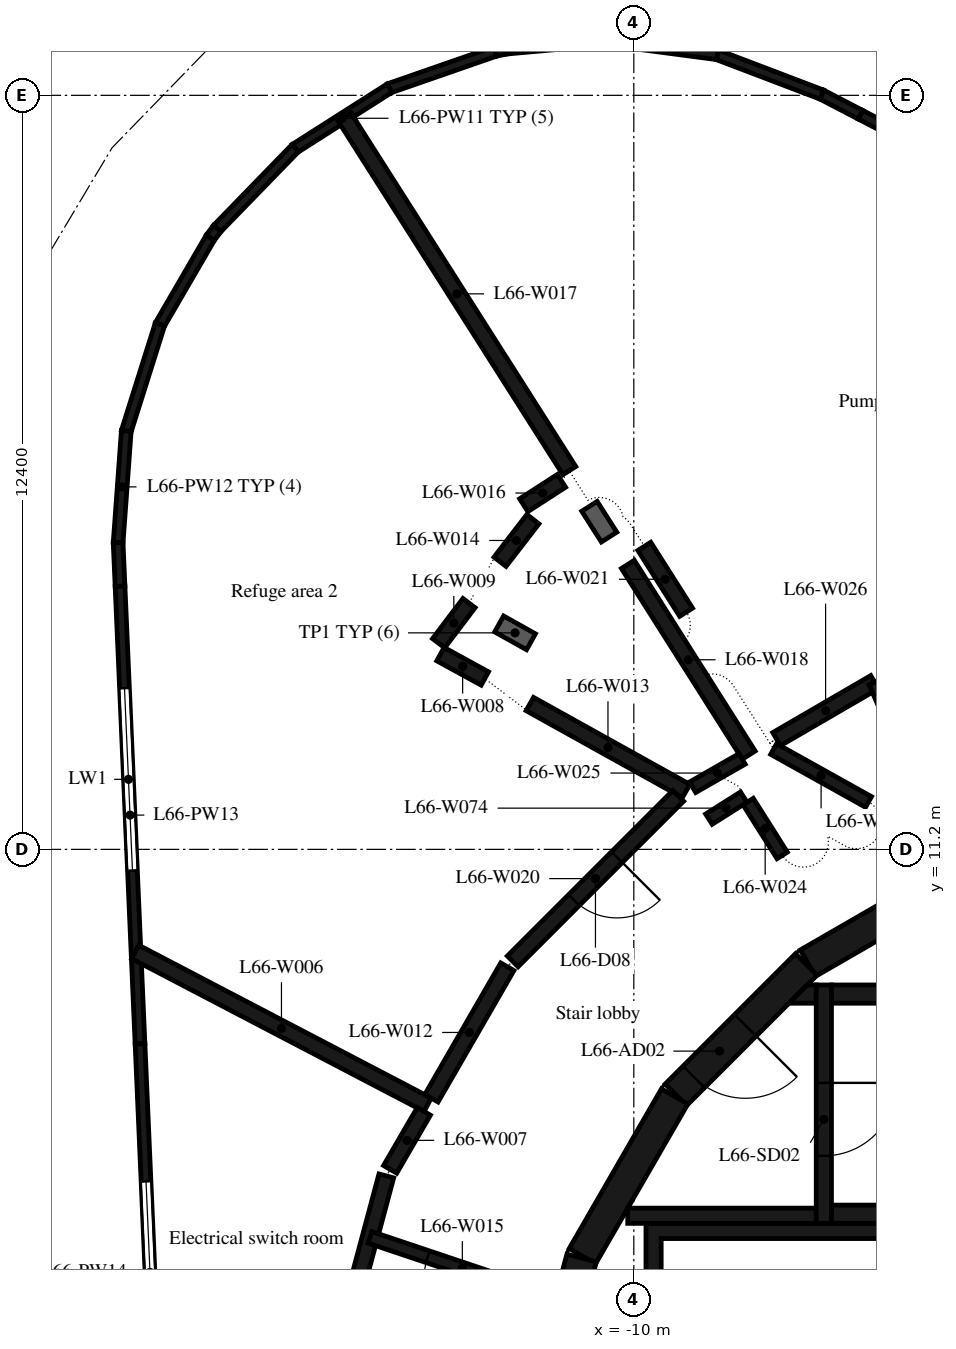
"""IFC4 building model, lengths in metres.
Left out: names, types, materials, properties, quantities, classifications, styles, units other than length and angle.
Written with IfcOpenShell. Run it as: python <this file> out.ifc"""

import sys

from ifc_helpers import new_model, si_unit, direction, frame, frame_2d, origin, place, context, subcontext, project, spatial, polyline, rectangle, outline, extrude, element, fill, save


model = new_model("IFC4")
c1 = context("Model", 3, precision=1e-05, world=origin(), true_north=direction((0.0, 1.0)))
c2 = subcontext(c1, "Body", "Model", "MODEL_VIEW")
j1 = project(units=[si_unit("LENGTHUNIT", "METRE"), si_unit("PLANEANGLEUNIT", "RADIAN")], contexts=[c1])
p1 = place(None, origin())
s1 = spatial("IfcSite", under=j1, at=p1, CompositionType="ELEMENT")
p2 = place(p1, origin())
s2 = spatial("IfcBuilding", under=s1, at=p2, CompositionType="ELEMENT")
p3 = place(p2, frame((0.0, 0.0, 258.2)))
s3 = spatial("IfcBuildingStorey", under=s2, at=p3, CompositionType="ELEMENT", Elevation=258.2)
p4 = place(p3, frame((0.406, 19.805, 0.0), z_axis=(0.0, 0.0, 1.0), x_axis=(-0.88700649569, 0.461756945377, 0.0)))
e1 = element("IfcWall", 1, at=p4, inside=s3, PredefinedType="STANDARD", context=c2, shape_type="SweptSolid", body=[
    extrude(rectangle(XDim=7.53, YDim=0.16, at=frame_2d((3.765, 0.0))), origin(), (0.0, 0.0, 1.0), 4.75),
])
p5 = place(p4, frame((5.598, 0.0, 1.0)))
e2 = element("IfcOpeningElement", 2, at=p5, cuts=e1, PredefinedType="OPENING", context=c2, shape_type="SweptSolid", body=[
    extrude(rectangle(XDim=1.2, YDim=2.2, at=frame_2d((0.6, 1.1))), frame((0.0, 0.09, 0.0), z_axis=(0.0, -1.0, 0.0), x_axis=(1.0, 0.0, 0.0)), (0.0, 0.0, 1.0), 0.18),
])
p6 = place(p3, frame((-6.274, 23.282, 0.0), z_axis=(0.0, 0.0, 1.0), x_axis=(-0.887061476856, 0.461651314607, 0.0)))
e3 = element("IfcWall", 3, at=p6, inside=s3, PredefinedType="STANDARD", context=c2, shape_type="SweptSolid", body=[
    extrude(rectangle(XDim=0.721, YDim=0.16, at=frame_2d((0.36, 0.0))), origin(), (0.0, 0.0, 1.0), 4.75),
])
p7 = place(p3, frame((-6.909, 23.613, 0.0), z_axis=(0.0, 0.0, 1.0), x_axis=(-0.934628033196, 0.355626826272, 0.0)))
e4 = element("IfcWall", 4, at=p7, inside=s3, PredefinedType="STANDARD", context=c2, shape_type="SweptSolid", body=[
    extrude(rectangle(XDim=1.846, YDim=0.16, at=frame_2d((0.923, 0.0))), origin(), (0.0, 0.0, 1.0), 4.75),
])
p8 = place(p3, frame((-8.625, 24.267, 0.0), z_axis=(0.0, 0.0, 1.0), x_axis=(-0.991428647281, 0.130649291427, 0.0)))
e5 = element("IfcWall", 5, at=p8, inside=s3, PredefinedType="STANDARD", context=c2, shape_type="SweptSolid", body=[
    extrude(rectangle(XDim=1.848, YDim=0.16, at=frame_2d((0.924, 0.0))), origin(), (0.0, 0.0, 1.0), 4.75),
])
p9 = place(p3, frame((-10.448, 24.508, 0.0), z_axis=(0.0, 0.0, 1.0), x_axis=(-0.995950985293, -0.089897913736, 0.0)))
e6 = element("IfcWall", 6, at=p9, inside=s3, PredefinedType="STANDARD", context=c2, shape_type="SweptSolid", body=[
    extrude(rectangle(XDim=1.656, YDim=0.16, at=frame_2d((0.828, 0.0))), origin(), (0.0, 0.0, 1.0), 4.75),
])
p10 = place(p3, frame((-12.098, 24.359, 0.0), z_axis=(0.0, 0.0, 1.0), x_axis=(-0.978969744076, -0.204005490574, 0.0)))
e7 = element("IfcWall", 7, at=p10, inside=s3, PredefinedType="STANDARD", context=c2, shape_type="SweptSolid", body=[
    extrude(rectangle(XDim=0.19, YDim=0.16, at=frame_2d((0.095, 0.0))), origin(), (0.0, 0.0, 1.0), 4.75),
])
p11 = place(p3, frame((-12.28, 24.322, 0.0), z_axis=(0.0, 0.0, 1.0), x_axis=(-0.944559218064, -0.328341108561, 0.0)))
e8 = element("IfcWall", 8, at=p11, inside=s3, PredefinedType="STANDARD", context=c2, shape_type="SweptSolid", body=[
    extrude(rectangle(XDim=1.846, YDim=0.16, at=frame_2d((0.923, 0.0))), origin(), (0.0, 0.0, 1.0), 4.75),
])
p12 = place(p3, frame((-14.015, 23.719, 0.0), z_axis=(0.0, 0.0, 1.0), x_axis=(-0.843373106488, -0.537328394236, 0.0)))
e9 = element("IfcWall", 9, at=p12, inside=s3, PredefinedType="STANDARD", context=c2, shape_type="SweptSolid", body=[
    extrude(rectangle(XDim=1.848, YDim=0.16, at=frame_2d((0.924, 0.0))), origin(), (0.0, 0.0, 1.0), 4.75),
])
p13 = place(p3, frame((-15.567, 22.732, 0.0), z_axis=(0.0, 0.0, 1.0), x_axis=(-0.696715693366, -0.71734736538, 0.0)))
e10 = element("IfcWall", 10, at=p13, inside=s3, PredefinedType="STANDARD", context=c2, shape_type="SweptSolid", body=[
    extrude(rectangle(XDim=1.846, YDim=0.16, at=frame_2d((0.923, 0.0))), origin(), (0.0, 0.0, 1.0), 4.75),
])
p14 = place(p3, frame((-16.85, 21.412, 0.0), z_axis=(0.0, 0.0, 1.0), x_axis=(-0.599178539895, -0.800615436605, 0.0)))
e11 = element("IfcWall", 11, at=p14, inside=s3, PredefinedType="STANDARD", context=c2, shape_type="SweptSolid", body=[
    extrude(rectangle(XDim=0.19, YDim=0.16, at=frame_2d((0.095, 0.0))), origin(), (0.0, 0.0, 1.0), 4.75),
])
p15 = place(p3, frame((-16.964, 21.26, 0.0), z_axis=(0.0, 0.0, 1.0), x_axis=(-0.502331021431, -0.864675398579, 0.0)))
e12 = element("IfcWall", 12, at=p15, inside=s3, PredefinedType="STANDARD", context=c2, shape_type="SweptSolid", body=[
    extrude(rectangle(XDim=1.657, YDim=0.16, at=frame_2d((0.828, 0.0))), origin(), (0.0, 0.0, 1.0), 4.75),
])
p16 = place(p3, frame((-17.792, 19.835, 0.0), z_axis=(0.0, 0.0, 1.0), x_axis=(-0.300688740971, -0.953722329116, 0.0)))
e13 = element("IfcWall", 13, at=p16, inside=s3, PredefinedType="STANDARD", context=c2, shape_type="SweptSolid", body=[
    extrude(rectangle(XDim=1.848, YDim=0.16, at=frame_2d((0.924, 0.0))), origin(), (0.0, 0.0, 1.0), 4.75),
])
p17 = place(p3, frame((-18.346, 18.082, 0.0), z_axis=(0.0, 0.0, 1.0), x_axis=(-0.072731814363, -0.997351534405, 0.0)))
e14 = element("IfcWall", 14, at=p17, inside=s3, PredefinedType="STANDARD", context=c2, shape_type="SweptSolid", body=[
    extrude(rectangle(XDim=1.846, YDim=0.16, at=frame_2d((0.923, 0.0))), origin(), (0.0, 0.0, 1.0), 4.75),
])
p18 = place(p3, frame((-18.48, 16.245, 0.0), z_axis=(0.0, 0.0, 1.0), x_axis=(0.043349043564, -0.9990599884, 0.0)))
e15 = element("IfcWall", 15, at=p18, inside=s3, PredefinedType="STANDARD", context=c2, shape_type="SweptSolid", body=[
    extrude(rectangle(XDim=0.721, YDim=0.16, at=frame_2d((0.36, 0.0))), origin(), (0.0, 0.0, 1.0), 4.75),
])
p19 = place(p3, frame((-18.449, 15.525, 0.0), z_axis=(0.0, 0.0, 1.0), x_axis=(0.043639829449, -0.999047328852, 0.0)))
e16 = element("IfcWall", 16, at=p19, inside=s3, PredefinedType="STANDARD", context=c2, shape_type="SweptSolid", body=[
    extrude(rectangle(XDim=7.53, YDim=0.16, at=frame_2d((3.765, 0.0))), origin(), (0.0, 0.0, 1.0), 4.75),
])
p20 = place(p19, frame((1.677, 0.0, 1.0)))
e17 = element("IfcOpeningElement", 17, at=p20, cuts=e16, PredefinedType="OPENING", context=c2, shape_type="SweptSolid", body=[
    extrude(rectangle(XDim=3.0, YDim=2.2, at=frame_2d((1.5, 1.1))), frame((0.0, 0.09, 0.0), z_axis=(0.0, -1.0, 0.0), x_axis=(1.0, 0.0, 0.0)), (0.0, 0.0, 1.0), 0.18),
])
p21 = place(p3, frame((-18.121, 8.002, 0.0), z_axis=(0.0, 0.0, 1.0), x_axis=(0.043608881799, -0.999048680209, 0.0)))
e18 = element("IfcWall", 18, at=p21, inside=s3, PredefinedType="STANDARD", context=c2, shape_type="SweptSolid", body=[
    extrude(rectangle(XDim=7.53, YDim=0.16, at=frame_2d((3.765, 0.0))), origin(), (0.0, 0.0, 1.0), 4.75),
])
p22 = place(p21, frame((2.265, 0.0, 1.0)))
e19 = element("IfcOpeningElement", 19, at=p22, cuts=e18, PredefinedType="OPENING", context=c2, shape_type="SweptSolid", body=[
    extrude(rectangle(XDim=3.0, YDim=2.2, at=frame_2d((1.5, 1.1))), frame((0.0, 0.09, 0.0), z_axis=(0.0, -1.0, 0.0), x_axis=(1.0, 0.0, 0.0)), (0.0, 0.0, 1.0), 0.18),
])
p23 = place(p3, frame((-4.51, 10.845, 0.0), z_axis=(0.0, 0.0, 1.0), x_axis=(-0.865975092491, -0.500087131594, 0.0)))
e20 = element("IfcWall", 20, at=p23, inside=s3, PredefinedType="SHEAR", context=c2, shape_type="SweptSolid", body=[
    extrude(rectangle(XDim=3.033, YDim=0.5, at=frame_2d((1.516, 0.0))), origin(), (0.0, 0.0, 1.0), 4.75),
])
p24 = place(p3, frame((-7.164, 9.308, 0.0), z_axis=(0.0, 0.0, 1.0), x_axis=(-0.707106781187, -0.707106781187, 0.0)))
e21 = element("IfcWall", 21, at=p24, inside=s3, PredefinedType="SHEAR", context=c2, shape_type="SweptSolid", body=[
    extrude(rectangle(XDim=3.032, YDim=0.5, at=frame_2d((1.516, 0.0))), origin(), (0.0, 0.0, 1.0), 4.75),
])
p25 = place(p24, frame((1.416, 0.0, 0.0)))
e22 = element("IfcOpeningElement", 22, at=p25, cuts=e21, PredefinedType="OPENING", context=c2, shape_type="SweptSolid", body=[
    extrude(rectangle(XDim=1.2, YDim=2.1, at=frame_2d((0.6, 1.05))), frame((0.0, 0.26, 0.0), z_axis=(0.0, -1.0, 0.0), x_axis=(1.0, 0.0, 0.0)), (0.0, 0.0, 1.0), 0.52),
])
for number, where, z_axis, x_axis in (
    (23, (-9.329, 7.137, 0.0), (0.0, 0.0, 1.0), (-0.5, -0.866, 0.0)),
    (24, (-10.858, 4.479, 0.0), (0.0, 0.0, 1.0), (-0.259, -0.966, 0.0)),
):
    element("IfcWall", number, at=place(p3, frame(where, z_axis=z_axis, x_axis=x_axis)), inside=s3, PredefinedType="SHEAR", context=c2, shape_type="SweptSolid", body=[
        extrude(rectangle(XDim=3.033, YDim=0.5, at=frame_2d((1.516, 0.0))), origin(), (0.0, 0.0, 1.0), 4.75),
    ])
for number, where, z_axis, x_axis in (
    (25, (-6.75, 5.2, 0.0), (0.0, 0.0, 1.0), (1.0, 0.0, 0.0)),
    (26, (-6.75, 8.82, 0.0), (0.0, 0.0, 1.0), (1.0, 0.0, 0.0)),
):
    element("IfcWall", number, at=place(p3, frame(where, z_axis=z_axis, x_axis=x_axis)), inside=s3, PredefinedType="SHEAR", context=c2, shape_type="SweptSolid", body=[
        extrude(rectangle(XDim=6.75, YDim=0.3, at=frame_2d((3.375, 0.0))), origin(), (0.0, 0.0, 1.0), 4.75),
    ])
p26 = place(p3, frame((-6.875, 8.97, 0.0), z_axis=(0.0, 0.0, 1.0), x_axis=(0.0, -1.0, 0.0)))
e27 = element("IfcWall", 27, at=p26, inside=s3, PredefinedType="SHEAR", context=c2, shape_type="SweptSolid", body=[
    extrude(rectangle(XDim=3.92, YDim=0.25, at=frame_2d((1.96, 0.0))), origin(), (0.0, 0.0, 1.0), 4.75),
])
p27 = place(p26, frame((1.61, 0.0, 0.0)))
e28 = element("IfcOpeningElement", 28, at=p27, cuts=e27, PredefinedType="OPENING", context=c2, shape_type="SweptSolid", body=[
    extrude(rectangle(XDim=1.2, YDim=2.1, at=frame_2d((0.6, 1.05))), frame((0.0, 0.135, 0.0), z_axis=(0.0, -1.0, 0.0), x_axis=(1.0, 0.0, 0.0)), (0.0, 0.0, 1.0), 0.27),
])
p28 = place(p3, frame((-7.0, 5.175, 0.0), z_axis=(0.0, 0.0, 1.0), x_axis=(-1.0, 0.0, 0.0)))
e29 = element("IfcWall", 29, at=p28, inside=s3, PredefinedType="SHEAR", context=c2, shape_type="SweptSolid", body=[
    extrude(rectangle(XDim=3.1, YDim=0.25, at=frame_2d((1.55, 0.0))), origin(), (0.0, 0.0, 1.0), 4.75),
])
p29 = place(p3, origin())
e30 = element("IfcWall", 30, at=p29, inside=s3, PredefinedType="SHEAR", context=c2, shape_type="SweptSolid", body=[
    extrude(outline(polyline([(-7.148, 8.97), (-7.0, 8.97), (-7.0, 8.67), (-7.448, 8.67), (-7.148, 8.97)])), origin(), (0.0, 0.0, 1.0), 4.75),
])
p30 = place(p3, origin())
e31 = element("IfcWall", 31, at=p30, inside=s3, PredefinedType="SHEAR", context=c2, shape_type="SweptSolid", body=[
    extrude(outline(polyline([(-9.55, 4.8), (-5.5, 4.8), (-5.5, 1.9), (-5.25, 1.9), (-5.25, 4.8), (-1.2, 4.8), (-1.2, 1.9), (-0.95, 1.9), (-0.95, 4.8), (0.95, 4.8), (0.95, 1.9), (1.2, 1.9), (1.2, 4.8), (3.1, 4.8), (3.1, 1.9), (3.35, 1.9), (3.35, 4.8), (5.25, 4.8), (5.25, 1.9), (5.5, 1.9), (5.5, 4.8), (7.4, 4.8), (7.4, 1.9), (7.65, 1.9), (7.65, 4.8), (9.55, 4.8), (9.55, 1.9), (9.8, 1.9), (9.8, 4.8), (9.8, 5.05), (-9.8, 5.05), (-9.8, 4.8), (-9.8, 1.9), (-9.55, 1.9), (-9.55, 4.8)])), origin(), (0.0, 0.0, 1.0), 4.75),
])
p31 = place(p3, frame((-14.07, 5.83, 0.0), z_axis=(0.0, 0.0, 1.0), x_axis=(-0.259059323171, -0.965861411942, 0.0)))
e32 = element("IfcWall", 32, at=p31, inside=s3, PredefinedType="PARTITIONING", context=c2, shape_type="SweptSolid", body=[
    extrude(rectangle(XDim=3.851, YDim=0.25, at=frame_2d((1.925, 0.0))), origin(), (0.0, 0.0, 1.0), 4.75),
])
p32 = place(p3, frame((-13.39, 7.0, 0.0), z_axis=(0.0, 0.0, 1.0), x_axis=(-0.886293445751, 0.463124095701, 0.0)))
e33 = element("IfcWall", 33, at=p32, inside=s3, PredefinedType="PARTITIONING", context=c2, shape_type="SweptSolid", body=[
    extrude(rectangle(XDim=5.426, YDim=0.25, at=frame_2d((2.713, 0.0))), origin(), (0.0, 0.0, 1.0), 4.75),
])
p33 = place(p3, frame((-13.453, 6.892, 0.0), z_axis=(0.0, 0.0, 1.0), x_axis=(-0.502370413152, -0.864652512857, 0.0)))
e34 = element("IfcWall", 34, at=p33, inside=s3, PredefinedType="PARTITIONING", context=c2, shape_type="SweptSolid", body=[
    extrude(rectangle(XDim=1.103, YDim=0.25, at=frame_2d((0.552, 0.0))), origin(), (0.0, 0.0, 1.0), 4.75),
])
p34 = place(p3, frame((-13.18, 14.41, 0.0), z_axis=(0.0, 0.0, 1.0), x_axis=(0.877019761318, -0.480454304026, 0.0)))
e35 = element("IfcWall", 35, at=p34, inside=s3, PredefinedType="PARTITIONING", context=c2, shape_type="SweptSolid", body=[
    extrude(rectangle(XDim=0.832, YDim=0.25, at=frame_2d((0.416, 0.0))), origin(), (0.0, 0.0, 1.0), 4.75),
])
p35 = place(p3, frame((-12.71, 15.25, 0.0), z_axis=(0.0, 0.0, 1.0), x_axis=(-0.603908782769, -0.797053437415, 0.0)))
e36 = element("IfcWall", 36, at=p35, inside=s3, PredefinedType="PARTITIONING", context=c2, shape_type="SweptSolid", body=[
    extrude(rectangle(XDim=0.828, YDim=0.25, at=frame_2d((0.414, 0.0))), origin(), (0.0, 0.0, 1.0), 4.75),
])
p36 = place(p3, frame((-12.08, 9.27, 0.0), z_axis=(0.0, 0.0, 1.0), x_axis=(-0.499821239653, -0.866128586522, 0.0)))
e37 = element("IfcWall", 37, at=p36, inside=s3, PredefinedType="PARTITIONING", context=c2, shape_type="SweptSolid", body=[
    extrude(rectangle(XDim=2.496, YDim=0.25, at=frame_2d((1.248, 0.0))), origin(), (0.0, 0.0, 1.0), 4.75),
])
p37 = place(p3, frame((-11.71, 13.59, 0.0), z_axis=(0.0, 0.0, 1.0), x_axis=(0.873816418471, -0.486255968406, 0.0)))
e38 = element("IfcWall", 38, at=p37, inside=s3, PredefinedType="PARTITIONING", context=c2, shape_type="SweptSolid", body=[
    extrude(rectangle(XDim=2.941, YDim=0.25, at=frame_2d((1.471, 0.0))), origin(), (0.0, 0.0, 1.0), 4.75),
])
p38 = place(p3, frame((-11.66, 16.63, 0.0), z_axis=(0.0, 0.0, 1.0), x_axis=(-0.610857864415, -0.791740279058, 0.0)))
e39 = element("IfcWall", 39, at=p38, inside=s3, PredefinedType="PARTITIONING", context=c2, shape_type="SweptSolid", body=[
    extrude(rectangle(XDim=0.884, YDim=0.25, at=frame_2d((0.442, 0.0))), origin(), (0.0, 0.0, 1.0), 4.75),
])
p39 = place(p3, frame((-11.3, 3.8, 0.0), z_axis=(0.0, 0.0, 1.0), x_axis=(-0.94805712629, 0.318100118345, 0.0)))
e40 = element("IfcWall", 40, at=p39, inside=s3, PredefinedType="PARTITIONING", context=c2, shape_type="SweptSolid", body=[
    extrude(rectangle(XDim=3.207, YDim=0.2, at=frame_2d((1.603, 0.0))), origin(), (0.0, 0.0, 1.0), 4.75),
])
p40 = place(p39, frame((1.003, 0.0, 0.0)))
e41 = element("IfcOpeningElement", 41, at=p40, cuts=e40, PredefinedType="OPENING", context=c2, shape_type="SweptSolid", body=[
    extrude(rectangle(XDim=1.2, YDim=2.1, at=frame_2d((0.6, 1.05))), frame((0.0, 0.11, 0.0), z_axis=(0.0, -1.0, 0.0), x_axis=(1.0, 0.0, 0.0)), (0.0, 0.0, 1.0), 0.22),
])
p41 = place(p3, frame((-11.19, 17.26, 0.0), z_axis=(0.0, 0.0, 1.0), x_axis=(-0.840403598602, -0.541961060831, 0.0)))
e42 = element("IfcWall", 42, at=p41, inside=s3, PredefinedType="PARTITIONING", context=c2, shape_type="SweptSolid", body=[
    extrude(rectangle(XDim=0.738, YDim=0.25, at=frame_2d((0.369, 0.0))), origin(), (0.0, 0.0, 1.0), 4.75),
])
p42 = place(p3, frame((-11.061, 17.429, 0.0), z_axis=(0.0, 0.0, 1.0), x_axis=(-0.536545243725, 0.843871555058, 0.0)))
e43 = element("IfcWall", 43, at=p42, inside=s3, PredefinedType="PARTITIONING", context=c2, shape_type="SweptSolid", body=[
    extrude(rectangle(XDim=6.889, YDim=0.25, at=frame_2d((3.445, 0.0))), origin(), (0.0, 0.0, 1.0), 4.75),
])
p43 = place(p3, frame((-10.098, 15.886, 0.0), z_axis=(0.0, 0.0, 1.0), x_axis=(0.535343000647, -0.844634756364, 0.0)))
e44 = element("IfcWall", 44, at=p43, inside=s3, PredefinedType="PARTITIONING", context=c2, shape_type="SweptSolid", body=[
    extrude(rectangle(XDim=3.713, YDim=0.25, at=frame_2d((1.856, 0.0))), origin(), (0.0, 0.0, 1.0), 4.75),
])
p44 = place(p3, frame((-9.27, 12.08, 0.0), z_axis=(0.0, 0.0, 1.0), x_axis=(-0.707106781187, -0.707106781187, 0.0)))
e45 = element("IfcWall", 45, at=p44, inside=s3, PredefinedType="PARTITIONING", context=c2, shape_type="SweptSolid", body=[
    extrude(rectangle(XDim=3.849, YDim=0.25, at=frame_2d((1.925, 0.0))), origin(), (0.0, 0.0, 1.0), 4.75),
])
p45 = place(p44, frame((1.425, 0.0, 0.0)))
e46 = element("IfcOpeningElement", 46, at=p45, cuts=e45, PredefinedType="OPENING", context=c2, shape_type="SweptSolid", body=[
    extrude(rectangle(XDim=1.0, YDim=2.1, at=frame_2d((0.5, 1.05))), frame((0.0, 0.135, 0.0), z_axis=(0.0, -1.0, 0.0), x_axis=(1.0, 0.0, 0.0)), (0.0, 0.0, 1.0), 0.27),
])
p46 = place(p3, frame((-9.14, 15.1, 0.0), z_axis=(0.0, 0.0, 1.0), x_axis=(-0.535889684675, 0.844288011202, 0.0)))
e47 = element("IfcWall", 47, at=p46, inside=s3, PredefinedType="PARTITIONING", context=c2, shape_type="SweptSolid", body=[
    extrude(rectangle(XDim=1.282, YDim=0.25, at=frame_2d((0.641, 0.0))), origin(), (0.0, 0.0, 1.0), 4.75),
])
p47 = place(p3, frame((-8.12, 11.986, 0.0), z_axis=(0.0, 0.0, 1.0), x_axis=(0.534054329683, -0.845450159943, 0.0)))
e48 = element("IfcWall", 48, at=p47, inside=s3, PredefinedType="PARTITIONING", context=c2, shape_type="SweptSolid", body=[
    extrude(rectangle(XDim=1.048, YDim=0.2, at=frame_2d((0.524, 0.0))), origin(), (0.0, 0.0, 1.0), 4.75),
])
p48 = place(p3, frame((-8.219, 12.688, 0.0), z_axis=(0.0, 0.0, 1.0), x_axis=(-0.867665313517, -0.497148774231, 0.0)))
e49 = element("IfcWall", 49, at=p48, inside=s3, PredefinedType="PARTITIONING", context=c2, shape_type="SweptSolid", body=[
    extrude(rectangle(XDim=0.937, YDim=0.2, at=frame_2d((0.469, 0.0))), origin(), (0.0, 0.0, 1.0), 4.75),
])
p49 = place(p3, frame((-7.652, 13.013, 0.0), z_axis=(0.0, 0.0, 1.0), x_axis=(0.864528358021, 0.50258404091, 0.0)))
e50 = element("IfcWall", 50, at=p49, inside=s3, PredefinedType="PARTITIONING", context=c2, shape_type="SweptSolid", body=[
    extrude(rectangle(XDim=1.865, YDim=0.25, at=frame_2d((0.932, 0.0))), origin(), (0.0, 0.0, 1.0), 4.75),
])
p50 = place(p3, frame((-6.14, 11.98, 0.0), z_axis=(0.0, 0.0, 1.0), x_axis=(-0.873343748456, 0.487104400547, 0.0)))
e51 = element("IfcWall", 51, at=p50, inside=s3, PredefinedType="PARTITIONING", context=c2, shape_type="SweptSolid", body=[
    extrude(rectangle(XDim=1.786, YDim=0.2, at=frame_2d((0.893, 0.0))), origin(), (0.0, 0.0, 1.0), 4.75),
])
p51 = place(p3, frame((-6.039, 13.948, 0.0), z_axis=(0.0, 0.0, 1.0), x_axis=(0.396897353622, -0.917863002135, 0.0)))
e52 = element("IfcWall", 52, at=p51, inside=s3, PredefinedType="PARTITIONING", context=c2, shape_type="SweptSolid", body=[
    extrude(rectangle(XDim=3.223, YDim=0.2, at=frame_2d((1.612, 0.0))), origin(), (0.0, 0.0, 1.0), 4.75),
])
p52 = place(p51, frame((0.312, 0.0, 0.0)))
e53 = element("IfcOpeningElement", 53, at=p52, cuts=e52, PredefinedType="OPENING", context=c2, shape_type="SweptSolid", body=[
    extrude(rectangle(XDim=1.2, YDim=2.1, at=frame_2d((0.6, 1.05))), frame((0.0, 0.11, 0.0), z_axis=(0.0, -1.0, 0.0), x_axis=(1.0, 0.0, 0.0)), (0.0, 0.0, 1.0), 0.22),
])
p53 = place(p3, frame((-8.192, 12.059, 0.0), z_axis=(0.0, 0.0, 1.0), x_axis=(-0.845540263532, -0.533911661932, 0.0)))
e54 = element("IfcWall", 54, at=p53, inside=s3, PredefinedType="PARTITIONING", context=c2, shape_type="SweptSolid", body=[
    extrude(rectangle(XDim=0.678, YDim=0.2, at=frame_2d((0.339, 0.0))), origin(), (0.0, 0.0, 1.0), 4.75),
])
p54 = place(p20, origin())
e55 = element("IfcWindow", 55, at=p54, inside=s3, PartitioningType="SINGLE_PANEL", PredefinedType="WINDOW", context=c2, shape_type="SweptSolid", body=[
    extrude(rectangle(XDim=3.0, YDim=2.2, at=frame_2d((1.5, 1.1))), frame((0.0, 0.03, 0.0), z_axis=(0.0, -1.0, 0.0), x_axis=(1.0, 0.0, 0.0)), (0.0, 0.0, 1.0), 0.06),
])
fill(e17, e55)
p55 = place(p22, origin())
e56 = element("IfcWindow", 56, at=p55, inside=s3, PartitioningType="SINGLE_PANEL", PredefinedType="WINDOW", context=c2, shape_type="SweptSolid", body=[
    extrude(rectangle(XDim=3.0, YDim=2.2, at=frame_2d((1.5, 1.1))), frame((0.0, 0.03, 0.0), z_axis=(0.0, -1.0, 0.0), x_axis=(1.0, 0.0, 0.0)), (0.0, 0.0, 1.0), 0.06),
])
fill(e19, e56)
p56 = place(p27, origin())
e57 = element("IfcDoor", 57, at=p56, inside=s3, OperationType="SINGLE_SWING_LEFT", PredefinedType="DOOR", context=c2, shape_type="SweptSolid", body=[
    extrude(rectangle(XDim=1.2, YDim=2.1, at=frame_2d((0.6, 1.05))), frame((0.0, 0.025, 0.0), z_axis=(0.0, -1.0, 0.0), x_axis=(1.0, 0.0, 0.0)), (0.0, 0.0, 1.0), 0.05),
])
fill(e28, e57)
p57 = place(p25, origin())
e58 = element("IfcDoor", 58, at=p57, inside=s3, OperationType="SINGLE_SWING_RIGHT", PredefinedType="DOOR", context=c2, shape_type="SweptSolid", body=[
    extrude(rectangle(XDim=1.2, YDim=2.1, at=frame_2d((0.6, 1.05))), frame((0.0, 0.025, 0.0), z_axis=(0.0, -1.0, 0.0), x_axis=(1.0, 0.0, 0.0)), (0.0, 0.0, 1.0), 0.05),
])
fill(e22, e58)
p58 = place(p45, origin())
e59 = element("IfcDoor", 59, at=p58, inside=s3, OperationType="SINGLE_SWING_LEFT", PredefinedType="DOOR", context=c2, shape_type="SweptSolid", body=[
    extrude(rectangle(XDim=1.0, YDim=2.1, at=frame_2d((0.5, 1.05))), frame((0.0, 0.025, 0.0), z_axis=(0.0, -1.0, 0.0), x_axis=(1.0, 0.0, 0.0)), (0.0, 0.0, 1.0), 0.05),
])
fill(e46, e59)
p59 = place(p40, origin())
e60 = element("IfcDoor", 60, at=p59, inside=s3, OperationType="SINGLE_SWING_LEFT", PredefinedType="DOOR", context=c2, shape_type="SweptSolid", body=[
    extrude(rectangle(XDim=1.2, YDim=2.1, at=frame_2d((0.6, 1.05))), frame((0.0, 0.025, 0.0), z_axis=(0.0, -1.0, 0.0), x_axis=(1.0, 0.0, 0.0)), (0.0, 0.0, 1.0), 0.05),
])
fill(e41, e60)
save(model, sys.argv[1])
